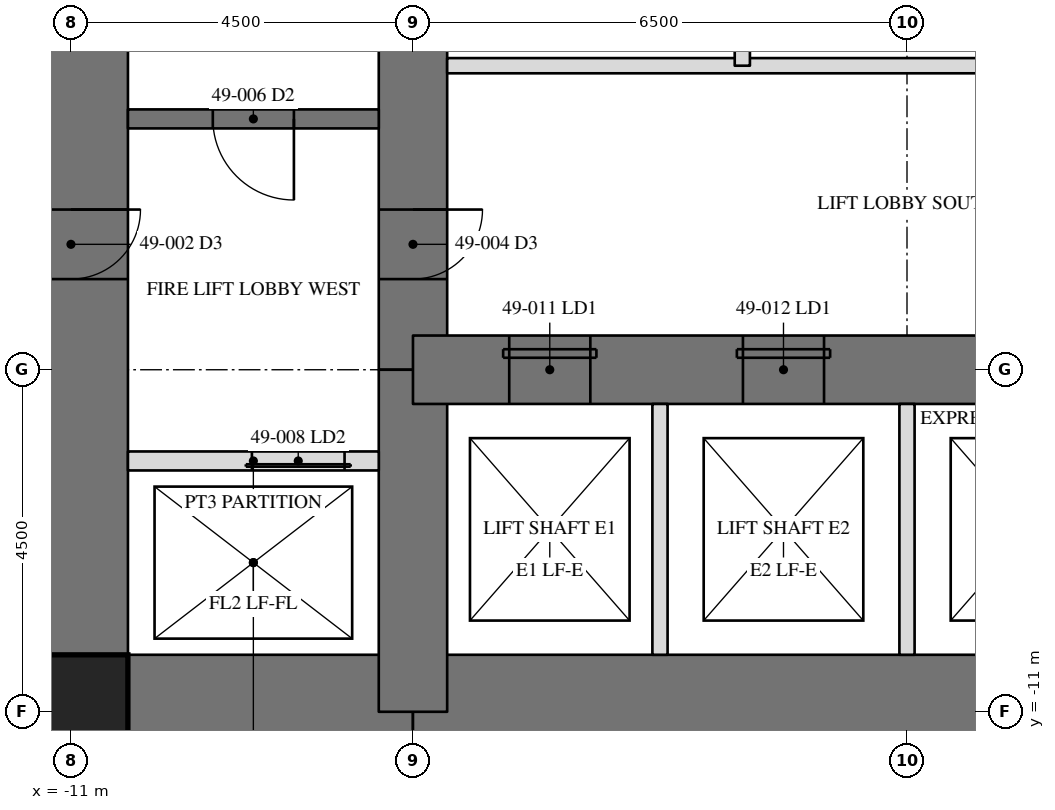
"""IFC4 building model, lengths in metres.
Left out: names, types, materials, properties, quantities, classifications, styles, units other than length and angle.
Written with IfcOpenShell. Run it as: python <this file> out.ifc"""

import sys

from ifc_helpers import new_model, si_unit, direction, frame, frame_2d, origin, origin_2d, place, context, subcontext, project, spatial, rectangle, hollow_rectangle, extrude, element, fill, save


model = new_model("IFC4")
c1 = context("Model", 3, precision=1e-05, world=origin(), true_north=direction((0.0, 1.0)))
c2 = subcontext(c1, "Body", "Model", "MODEL_VIEW")
j1 = project(units=[si_unit("LENGTHUNIT", "METRE"), si_unit("PLANEANGLEUNIT", "RADIAN")], contexts=[c1])
p1 = place(None, origin())
s1 = spatial("IfcSite", under=j1, at=p1, CompositionType="ELEMENT")
p2 = place(p1, origin())
s2 = spatial("IfcBuilding", under=s1, at=p2, CompositionType="ELEMENT")
p3 = place(p2, frame((0.0, 0.0, 208.2)))
s3 = spatial("IfcBuildingStorey", under=s2, at=p3, CompositionType="ELEMENT", Elevation=208.2)
p4 = place(p3, frame((-11.0, 11.0, 0.0), z_axis=(0.0, 0.0, 1.0), x_axis=(0.0, -1.0, 0.0)))
e1 = element("IfcWall", 1, at=p4, inside=s3, PredefinedType="SHEAR", context=c2, shape_type="SweptSolid", body=[
    extrude(rectangle(XDim=22.0, YDim=1.5, at=frame_2d((11.0, 0.0))), origin(), (0.0, 0.0, 1.0), 3.5),
])
p5 = place(p4, frame((15.393, 0.0, 0.0)))
e2 = element("IfcOpeningElement", 2, at=p5, cuts=e1, PredefinedType="OPENING", context=c2, shape_type="SweptSolid", body=[
    extrude(rectangle(XDim=0.915, YDim=2.134, at=frame_2d((0.458, 1.067))), frame((0.0, 0.76, 0.0), z_axis=(0.0, -1.0, 0.0), x_axis=(1.0, 0.0, 0.0)), (0.0, 0.0, 1.0), 1.52),
])
p6 = place(p3, frame((-11.0, -11.0, 0.0), z_axis=(0.0, 0.0, 1.0), x_axis=(1.0, 0.0, 0.0)))
e3 = element("IfcWall", 3, at=p6, inside=s3, PredefinedType="SHEAR", context=c2, shape_type="SweptSolid", body=[
    extrude(rectangle(XDim=4.5, YDim=1.5, at=frame_2d((2.25, 0.0))), origin(), (0.0, 0.0, 1.0), 3.5),
])
p7 = place(p3, frame((-6.5, -11.0, 0.0), z_axis=(0.0, 0.0, 1.0), x_axis=(1.0, 0.0, 0.0)))
e4 = element("IfcWall", 4, at=p7, inside=s3, PredefinedType="SHEAR", context=c2, shape_type="SweptSolid", body=[
    extrude(rectangle(XDim=13.0, YDim=1.5, at=frame_2d((6.5, 0.0))), origin(), (0.0, 0.0, 1.0), 3.5),
])
p8 = place(p3, frame((-6.5, 6.5, 0.0), z_axis=(0.0, 0.0, 1.0), x_axis=(0.0, -1.0, 0.0)))
e5 = element("IfcWall", 5, at=p8, inside=s3, PredefinedType="SHEAR", context=c2, shape_type="SweptSolid", body=[
    extrude(rectangle(XDim=13.0, YDim=0.9, at=frame_2d((6.5, 0.0))), origin(), (0.0, 0.0, 1.0), 3.5),
])
p9 = place(p8, frame((10.893, 0.0, 0.0)))
e6 = element("IfcOpeningElement", 6, at=p9, cuts=e5, PredefinedType="OPENING", context=c2, shape_type="SweptSolid", body=[
    extrude(rectangle(XDim=0.915, YDim=2.134, at=frame_2d((0.458, 1.067))), frame((0.0, 0.46, 0.0), z_axis=(0.0, -1.0, 0.0), x_axis=(1.0, 0.0, 0.0)), (0.0, 0.0, 1.0), 0.92),
])
p10 = place(p8, frame((0.61, 0.0, 0.0)))
e7 = element("IfcOpeningElement", 7, at=p10, cuts=e5, PredefinedType="OPENING", context=c2, shape_type="SweptSolid", body=[
    extrude(rectangle(XDim=0.915, YDim=2.134, at=frame_2d((0.458, 1.067))), frame((0.0, 0.46, 0.0), z_axis=(0.0, -1.0, 0.0), x_axis=(1.0, 0.0, 0.0)), (0.0, 0.0, 1.0), 0.92),
])
p11 = place(p3, frame((-6.5, -6.5, 0.0), z_axis=(0.0, 0.0, 1.0), x_axis=(0.0, -1.0, 0.0)))
e8 = element("IfcWall", 8, at=p11, inside=s3, PredefinedType="SHEAR", context=c2, shape_type="SweptSolid", body=[
    extrude(rectangle(XDim=4.5, YDim=0.9, at=frame_2d((2.25, 0.0))), origin(), (0.0, 0.0, 1.0), 3.5),
])
p12 = place(p3, frame((-6.5, -6.5, 0.0), z_axis=(0.0, 0.0, 1.0), x_axis=(1.0, 0.0, 0.0)))
e9 = element("IfcWall", 9, at=p12, inside=s3, PredefinedType="SHEAR", context=c2, shape_type="SweptSolid", body=[
    extrude(rectangle(XDim=13.0, YDim=0.9, at=frame_2d((6.5, 0.0))), origin(), (0.0, 0.0, 1.0), 3.5),
])
p13 = place(p12, frame((1.267, 0.0, 0.0)))
e10 = element("IfcOpeningElement", 10, at=p13, cuts=e9, PredefinedType="OPENING", context=c2, shape_type="SweptSolid", body=[
    extrude(rectangle(XDim=1.067, YDim=2.134, at=frame_2d((0.533, 1.067))), frame((0.0, 0.46, 0.0), z_axis=(0.0, -1.0, 0.0), x_axis=(1.0, 0.0, 0.0)), (0.0, 0.0, 1.0), 0.92),
])
p14 = place(p12, frame((4.342, 0.0, 0.0)))
e11 = element("IfcOpeningElement", 11, at=p14, cuts=e9, PredefinedType="OPENING", context=c2, shape_type="SweptSolid", body=[
    extrude(rectangle(XDim=1.067, YDim=2.134, at=frame_2d((0.533, 1.067))), frame((0.0, 0.46, 0.0), z_axis=(0.0, -1.0, 0.0), x_axis=(1.0, 0.0, 0.0)), (0.0, 0.0, 1.0), 0.92),
])
p15 = place(p3, frame((-11.0, -11.0, 0.0), z_axis=(0.0, 0.0, 1.0), x_axis=(1.0, 0.0, 0.0)))
e12 = element("IfcColumn", 12, at=p15, inside=s3, PredefinedType="COLUMN", context=c2, shape_type="SweptSolid", body=[
    extrude(hollow_rectangle(XDim=1.499, YDim=1.499, WallThickness=0.102, at=origin_2d()), origin(), (0.0, 0.0, 1.0), 3.5),
])
p16 = place(p3, frame((-6.95, -3.2, 0.0), z_axis=(0.0, 0.0, 1.0), x_axis=(-1.0, 0.0, 0.0)))
e13 = element("IfcWall", 13, at=p16, inside=s3, PredefinedType="SOLIDWALL", context=c2, shape_type="SweptSolid", body=[
    extrude(rectangle(XDim=3.3, YDim=0.25, at=frame_2d((1.65, 0.0))), origin(), (0.0, 0.0, 1.0), 3.31),
])
p17 = place(p16, frame((1.116, 0.0, 0.0)))
e14 = element("IfcOpeningElement", 14, at=p17, cuts=e13, PredefinedType="OPENING", context=c2, shape_type="SweptSolid", body=[
    extrude(rectangle(XDim=1.067, YDim=2.134, at=frame_2d((0.533, 1.067))), frame((0.0, 0.135, 0.0), z_axis=(0.0, -1.0, 0.0), x_axis=(1.0, 0.0, 0.0)), (0.0, 0.0, 1.0), 0.27),
])
p18 = place(p3, frame((-6.95, -7.7, 0.0), z_axis=(0.0, 0.0, 1.0), x_axis=(-1.0, 0.0, 0.0)))
e15 = element("IfcWall", 15, at=p18, inside=s3, PredefinedType="PARTITIONING", context=c2, shape_type="SweptSolid", body=[
    extrude(rectangle(XDim=3.3, YDim=0.25, at=frame_2d((1.65, 0.0))), origin(), (0.0, 0.0, 1.0), 3.31),
])
p19 = place(p18, frame((0.45, 0.0, 0.0)))
e16 = element("IfcOpeningElement", 16, at=p19, cuts=e15, PredefinedType="OPENING", context=c2, shape_type="SweptSolid", body=[
    extrude(rectangle(XDim=1.219, YDim=2.134, at=frame_2d((0.609, 1.067))), frame((0.0, 0.135, 0.0), z_axis=(0.0, -1.0, 0.0), x_axis=(1.0, 0.0, 0.0)), (0.0, 0.0, 1.0), 0.27),
])
p20 = place(p3, frame((6.05, -2.5, 0.0), z_axis=(0.0, 0.0, 1.0), x_axis=(-1.0, 0.0, 0.0)))
e17 = element("IfcWall", 17, at=p20, inside=s3, PredefinedType="PARTITIONING", context=c2, shape_type="SweptSolid", body=[
    extrude(rectangle(XDim=12.1, YDim=0.2, at=frame_2d((6.05, 0.0))), origin(), (0.0, 0.0, 1.0), 3.31),
])
for number, where, z_axis, x_axis in (
    (18, (-3.25, -10.25, 0.0), (0.0, 0.0, 1.0), (0.0, 1.0, 0.0)),
    (19, (0.0, -10.25, 0.0), (0.0, 0.0, 1.0), (0.0, 1.0, 0.0)),
):
    element("IfcWall", number, at=place(p3, frame(where, z_axis=z_axis, x_axis=x_axis)), inside=s3, PredefinedType="PARTITIONING", context=c2, shape_type="SweptSolid", body=[
        extrude(rectangle(XDim=3.3, YDim=0.2, at=frame_2d((1.65, 0.0))), origin(), (0.0, 0.0, 1.0), 3.31),
    ])
p21 = place(p3, frame((-2.167, -2.5, 0.0), z_axis=(0.0, 0.0, 1.0), x_axis=(0.0, 1.0, 0.0)))
e20 = element("IfcWall", 20, at=p21, inside=s3, PredefinedType="PARTITIONING", context=c2, shape_type="SweptSolid", body=[
    extrude(rectangle(XDim=5.0, YDim=0.2, at=frame_2d((2.5, 0.0))), origin(), (0.0, 0.0, 1.0), 3.31),
])
p22 = place(p9, origin())
e21 = element("IfcDoor", 21, at=p22, inside=s3, OperationType="SINGLE_SWING_RIGHT", PredefinedType="DOOR", context=c2, shape_type="SweptSolid", body=[
    extrude(rectangle(XDim=0.915, YDim=2.134, at=frame_2d((0.458, 1.067))), frame((0.0, -0.375, 0.0), z_axis=(0.0, -1.0, 0.0), x_axis=(1.0, 0.0, 0.0)), (0.0, 0.0, 1.0), 0.05),
])
fill(e6, e21)
p23 = place(p17, origin())
e22 = element("IfcDoor", 22, at=p23, inside=s3, OperationType="SINGLE_SWING_LEFT", PredefinedType="DOOR", context=c2, shape_type="SweptSolid", body=[
    extrude(rectangle(XDim=1.067, YDim=2.134, at=frame_2d((0.533, 1.067))), frame((0.0, 0.025, 0.0), z_axis=(0.0, -1.0, 0.0), x_axis=(1.0, 0.0, 0.0)), (0.0, 0.0, 1.0), 0.05),
])
fill(e14, e22)
p24 = place(p19, origin())
e23 = element("IfcDoor", 23, at=p24, inside=s3, OperationType="SLIDING_TO_LEFT", PredefinedType="DOOR", context=c2, shape_type="SweptSolid", body=[
    extrude(rectangle(XDim=1.219, YDim=2.134, at=frame_2d((0.609, 1.067))), frame((0.0, 0.025, 0.0), z_axis=(0.0, -1.0, 0.0), x_axis=(1.0, 0.0, 0.0)), (0.0, 0.0, 1.0), 0.05),
])
fill(e16, e23)
p25 = place(p13, origin())
e24 = element("IfcDoor", 24, at=p25, inside=s3, OperationType="SLIDING_TO_LEFT", PredefinedType="DOOR", context=c2, shape_type="SweptSolid", body=[
    extrude(rectangle(XDim=1.067, YDim=2.134, at=frame_2d((0.533, 1.067))), frame((0.0, -0.375, 0.0), z_axis=(0.0, -1.0, 0.0), x_axis=(1.0, 0.0, 0.0)), (0.0, 0.0, 1.0), 0.05),
])
fill(e10, e24)
p26 = place(p14, origin())
e25 = element("IfcDoor", 25, at=p26, inside=s3, OperationType="SLIDING_TO_LEFT", PredefinedType="DOOR", context=c2, shape_type="SweptSolid", body=[
    extrude(rectangle(XDim=1.067, YDim=2.134, at=frame_2d((0.533, 1.067))), frame((0.0, -0.375, 0.0), z_axis=(0.0, -1.0, 0.0), x_axis=(1.0, 0.0, 0.0)), (0.0, 0.0, 1.0), 0.05),
])
fill(e11, e25)
save(model, sys.argv[1])
